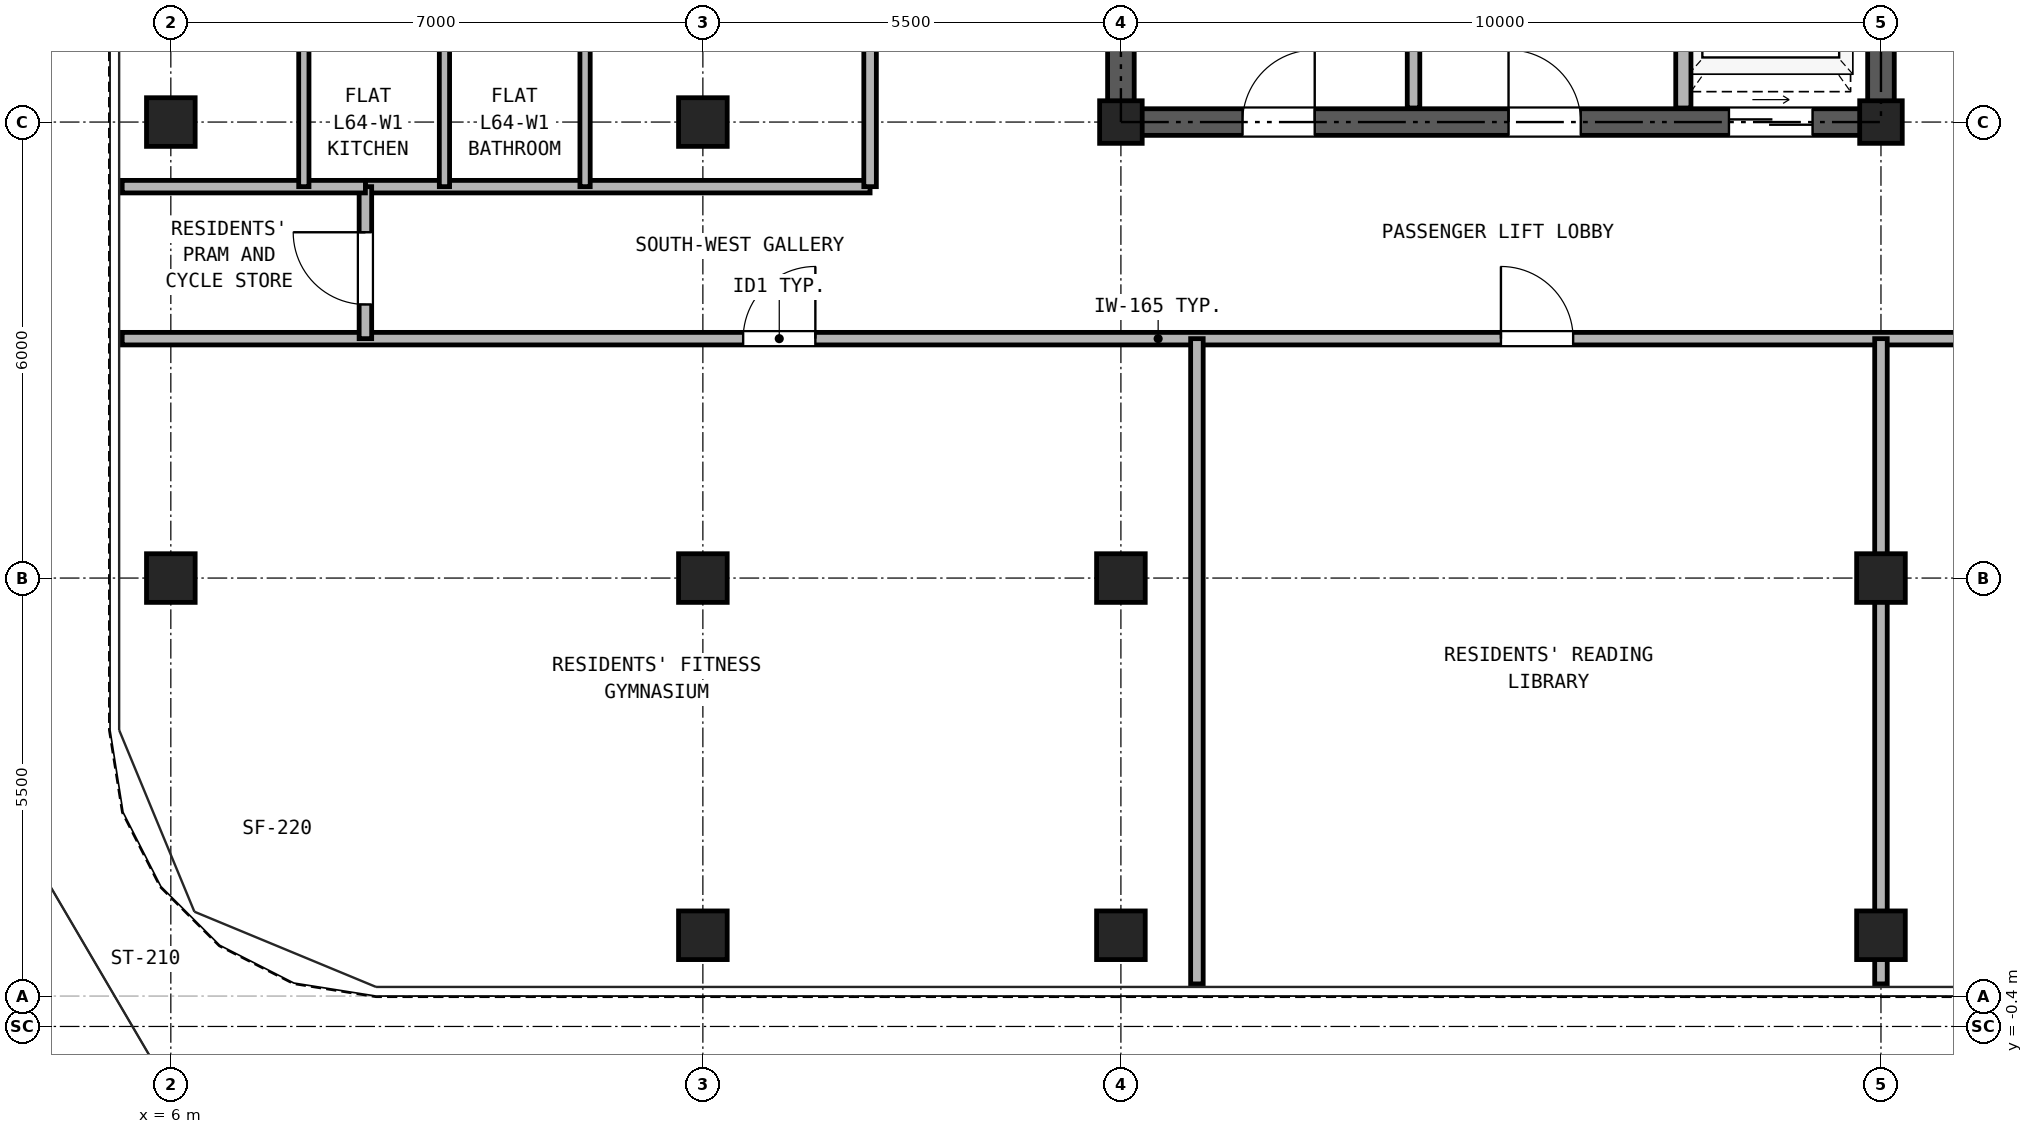
"""IFC4 building model, lengths in metres.
Left out: names, types, materials, properties, quantities, classifications, styles, units other than length and angle.
Written with IfcOpenShell. Run it as: python <this file> out.ifc"""

import sys

from ifc_helpers import new_model, si_unit, direction, frame, frame_2d, origin, origin_2d, place, context, subcontext, project, spatial, rectangle, hollow_rectangle, extrude, source, transform, mapped, element, fill, save


model = new_model("IFC4")
c1 = context("Model", 3, precision=1e-05, world=origin(), true_north=direction((0.0, 1.0)))
c2 = subcontext(c1, "Body", "Model", "MODEL_VIEW")
j1 = project(units=[si_unit("LENGTHUNIT", "METRE"), si_unit("PLANEANGLEUNIT", "RADIAN")], contexts=[c1])
p1 = place(None, origin())
s1 = spatial("IfcSite", under=j1, at=p1, CompositionType="ELEMENT")
p2 = place(p1, origin())
s2 = spatial("IfcBuilding", under=s1, at=p2, CompositionType="ELEMENT")
p3 = place(p2, frame((0.0, 0.0, 226.5)))
s3 = spatial("IfcBuildingStorey", under=s2, at=p3, CompositionType="ELEMENT", Elevation=226.5)
m1 = source(origin(), c2, "Body", "SweptSolid", [
    extrude(hollow_rectangle(XDim=0.64, YDim=0.64, WallThickness=0.035, at=origin_2d()), origin(), (0.0, 0.0, 1.0), 2.98),
])
for number, where, z_axis, x_axis in (
    (1, (13.0, 0.8, 0.0), (0.0, 0.0, 1.0), (1.0, 0.0, 0.0)),
    (2, (18.5, 0.8, 0.0), (0.0, 0.0, 1.0), (1.0, 0.0, 0.0)),
    (3, (28.5, 0.8, 0.0), (0.0, 0.0, 1.0), (1.0, 0.0, 0.0)),
    (4, (6.0, 5.5, 0.0), (0.0, 0.0, 1.0), (1.0, 0.0, 0.0)),
    (5, (6.0, 11.5, 0.0), (0.0, 0.0, 1.0), (1.0, 0.0, 0.0)),
    (6, (13.0, 5.5, 0.0), (0.0, 0.0, 1.0), (1.0, 0.0, 0.0)),
    (7, (13.0, 11.5, 0.0), (0.0, 0.0, 1.0), (1.0, 0.0, 0.0)),
    (8, (18.5, 5.5, 0.0), (0.0, 0.0, 1.0), (1.0, 0.0, 0.0)),
):
    element("IfcColumn", number, at=place(p3, frame(where, z_axis=z_axis, x_axis=x_axis)), inside=s3, PredefinedType="COLUMN", context=c2, shape_type="MappedRepresentation", body=[
        mapped(m1, transform((0.0, 0.0, 0.0), x_axis=(1.0, 0.0, 0.0), y_axis=(0.0, 1.0, 0.0), z_axis=(0.0, 0.0, 1.0), scale=1.0)),
    ])
m2 = source(origin(), c2, "Body", "SweptSolid", [
    extrude(hollow_rectangle(XDim=0.56, YDim=0.56, WallThickness=0.03, at=origin_2d()), origin(), (0.0, 0.0, 1.0), 2.98),
])
p4 = place(p3, frame((18.5, 11.5, 0.0), z_axis=(0.0, 0.0, 1.0), x_axis=(1.0, 0.0, 0.0)))
e9 = element("IfcColumn", 9, at=p4, inside=s3, PredefinedType="COLUMN", context=c2, shape_type="MappedRepresentation", body=[
    mapped(m2, transform((0.0, 0.0, 0.0), x_axis=(1.0, 0.0, 0.0), y_axis=(0.0, 1.0, 0.0), z_axis=(0.0, 0.0, 1.0), scale=1.0)),
])
p5 = place(p3, frame((28.5, 5.5, 0.0), z_axis=(0.0, 0.0, 1.0), x_axis=(1.0, 0.0, 0.0)))
e10 = element("IfcColumn", 10, at=p5, inside=s3, PredefinedType="COLUMN", context=c2, shape_type="MappedRepresentation", body=[
    mapped(m1, transform((0.0, 0.0, 0.0), x_axis=(1.0, 0.0, 0.0), y_axis=(0.0, 1.0, 0.0), z_axis=(0.0, 0.0, 1.0), scale=1.0)),
])
p6 = place(p3, frame((28.5, 11.5, 0.0), z_axis=(0.0, 0.0, 1.0), x_axis=(1.0, 0.0, 0.0)))
e11 = element("IfcColumn", 11, at=p6, inside=s3, PredefinedType="COLUMN", context=c2, shape_type="MappedRepresentation", body=[
    mapped(m2, transform((0.0, 0.0, 0.0), x_axis=(1.0, 0.0, 0.0), y_axis=(0.0, 1.0, 0.0), z_axis=(0.0, 0.0, 1.0), scale=1.0)),
])
p7 = place(p3, frame((18.325, 11.5, 0.0), z_axis=(0.0, 0.0, 1.0), x_axis=(1.0, 0.0, 0.0)))
e12 = element("IfcWall", 12, at=p7, inside=s3, PredefinedType="SHEAR", context=c2, shape_type="SweptSolid", body=[
    extrude(rectangle(XDim=10.35, YDim=0.35, at=frame_2d((5.175, 0.0))), origin(), (0.0, 0.0, 1.0), 2.98),
])
p8 = place(p7, frame((1.775, 0.0, 0.0)))
e13 = element("IfcOpeningElement", 13, at=p8, cuts=e12, PredefinedType="OPENING", context=c2, shape_type="SweptSolid", body=[
    extrude(rectangle(XDim=0.95, YDim=2.15, at=frame_2d((0.475, 1.075))), frame((0.0, 0.185, 0.0), z_axis=(0.0, -1.0, 0.0), x_axis=(1.0, 0.0, 0.0)), (0.0, 0.0, 1.0), 0.37),
])
p9 = place(p7, frame((5.275, 0.0, 0.0)))
e14 = element("IfcOpeningElement", 14, at=p9, cuts=e12, PredefinedType="OPENING", context=c2, shape_type="SweptSolid", body=[
    extrude(rectangle(XDim=0.95, YDim=2.15, at=frame_2d((0.475, 1.075))), frame((0.0, 0.185, 0.0), z_axis=(0.0, -1.0, 0.0), x_axis=(1.0, 0.0, 0.0)), (0.0, 0.0, 1.0), 0.37),
])
p10 = place(p7, frame((8.175, 0.0, 0.0)))
e15 = element("IfcOpeningElement", 15, at=p10, cuts=e12, PredefinedType="OPENING", context=c2, shape_type="SweptSolid", body=[
    extrude(rectangle(XDim=1.1, YDim=2.25, at=frame_2d((0.55, 1.125))), frame((0.0, 0.185, 0.0), z_axis=(0.0, -1.0, 0.0), x_axis=(1.0, 0.0, 0.0)), (0.0, 0.0, 1.0), 0.37),
])
p11 = place(p3, frame((18.5, 11.675, 0.0), z_axis=(0.0, 0.0, 1.0), x_axis=(0.0, 1.0, 0.0)))
e16 = element("IfcWall", 16, at=p11, inside=s3, PredefinedType="SHEAR", context=c2, shape_type="SweptSolid", body=[
    extrude(rectangle(XDim=16.9, YDim=0.35, at=frame_2d((8.45, 0.0))), origin(), (0.0, 0.0, 1.0), 2.98),
])
p12 = place(p11, frame((7.475, 0.0, 0.0)))
e17 = element("IfcOpeningElement", 17, at=p12, cuts=e16, PredefinedType="OPENING", context=c2, shape_type="SweptSolid", body=[
    extrude(rectangle(XDim=1.15, YDim=2.2, at=frame_2d((0.575, 1.1))), frame((0.0, 0.185, 0.0), z_axis=(0.0, -1.0, 0.0), x_axis=(1.0, 0.0, 0.0)), (0.0, 0.0, 1.0), 0.37),
])
p13 = place(p3, frame((28.5, 11.675, 0.0), z_axis=(0.0, 0.0, 1.0), x_axis=(0.0, 1.0, 0.0)))
e18 = element("IfcWall", 18, at=p13, inside=s3, PredefinedType="SHEAR", context=c2, shape_type="SweptSolid", body=[
    extrude(rectangle(XDim=16.9, YDim=0.35, at=frame_2d((8.45, 0.0))), origin(), (0.0, 0.0, 1.0), 2.98),
])
p14 = place(p13, frame((7.475, 0.0, 0.0)))
e19 = element("IfcOpeningElement", 19, at=p14, cuts=e18, PredefinedType="OPENING", context=c2, shape_type="SweptSolid", body=[
    extrude(rectangle(XDim=1.15, YDim=2.2, at=frame_2d((0.575, 1.1))), frame((0.0, 0.185, 0.0), z_axis=(0.0, -1.0, 0.0), x_axis=(1.0, 0.0, 0.0)), (0.0, 0.0, 1.0), 0.37),
])
p15 = place(p3, frame((22.35, 11.685, 0.0), z_axis=(0.0, 0.0, 1.0), x_axis=(0.0, 1.0, 0.0)))
e20 = element("IfcWall", 20, at=p15, inside=s3, PredefinedType="PARTITIONING", context=c2, shape_type="SweptSolid", body=[
    extrude(rectangle(XDim=3.315, YDim=0.165, at=frame_2d((1.657, 0.0))), origin(), (0.0, 0.0, 1.0), 2.98),
])
p16 = place(p3, frame((25.9, 11.685, 0.0), z_axis=(0.0, 0.0, 1.0), x_axis=(0.0, 1.0, 0.0)))
e21 = element("IfcWall", 21, at=p16, inside=s3, PredefinedType="PARTITIONING", context=c2, shape_type="SweptSolid", body=[
    extrude(rectangle(XDim=3.315, YDim=0.2, at=frame_2d((1.657, 0.0))), origin(), (0.0, 0.0, 1.0), 2.98),
])
p17 = place(p3, frame((5.36, 8.65, 0.0), z_axis=(0.0, 0.0, 1.0), x_axis=(1.0, 0.0, 0.0)))
e22 = element("IfcWall", 22, at=p17, inside=s3, PredefinedType="PARTITIONING", context=c2, shape_type="SweptSolid", body=[
    extrude(rectangle(XDim=36.28, YDim=0.165, at=frame_2d((18.14, 0.0))), origin(), (0.0, 0.0, 1.0), 2.655),
])
p18 = place(p17, frame((8.17, 0.0, 0.0)))
e23 = element("IfcOpeningElement", 23, at=p18, cuts=e22, PredefinedType="OPENING", context=c2, shape_type="SweptSolid", body=[
    extrude(rectangle(XDim=0.95, YDim=2.15, at=frame_2d((0.475, 1.075))), frame((0.0, 0.093, 0.0), z_axis=(0.0, -1.0, 0.0), x_axis=(1.0, 0.0, 0.0)), (0.0, 0.0, 1.0), 0.185),
])
p19 = place(p17, frame((18.14, 0.0, 0.0)))
e24 = element("IfcOpeningElement", 24, at=p19, cuts=e22, PredefinedType="OPENING", context=c2, shape_type="SweptSolid", body=[
    extrude(rectangle(XDim=0.95, YDim=2.15, at=frame_2d((0.475, 1.075))), frame((0.0, 0.093, 0.0), z_axis=(0.0, -1.0, 0.0), x_axis=(1.0, 0.0, 0.0)), (0.0, 0.0, 1.0), 0.185),
])
p20 = place(p17, frame((25.14, 0.0, 0.0)))
e25 = element("IfcOpeningElement", 25, at=p20, cuts=e22, PredefinedType="OPENING", context=c2, shape_type="SweptSolid", body=[
    extrude(rectangle(XDim=0.95, YDim=2.15, at=frame_2d((0.475, 1.075))), frame((0.0, 0.093, 0.0), z_axis=(0.0, -1.0, 0.0), x_axis=(1.0, 0.0, 0.0)), (0.0, 0.0, 1.0), 0.185),
])
p21 = place(p17, frame((29.99, 0.0, 0.0)))
e26 = element("IfcOpeningElement", 26, at=p21, cuts=e22, PredefinedType="OPENING", context=c2, shape_type="SweptSolid", body=[
    extrude(rectangle(XDim=0.95, YDim=2.15, at=frame_2d((0.475, 1.075))), frame((0.0, 0.093, 0.0), z_axis=(0.0, -1.0, 0.0), x_axis=(1.0, 0.0, 0.0)), (0.0, 0.0, 1.0), 0.185),
])
p22 = place(p3, frame((8.56, 10.65, 0.0), z_axis=(0.0, 0.0, 1.0), x_axis=(1.0, 0.0, 0.0)))
e27 = element("IfcWall", 27, at=p22, inside=s3, PredefinedType="PARTITIONING", context=c2, shape_type="SweptSolid", body=[
    extrude(rectangle(XDim=6.64, YDim=0.165, at=frame_2d((3.32, 0.0))), origin(), (0.0, 0.0, 1.0), 2.98),
])
p23 = place(p3, frame((8.56, 8.65, 0.0), z_axis=(0.0, 0.0, 1.0), x_axis=(0.0, 1.0, 0.0)))
e28 = element("IfcWall", 28, at=p23, inside=s3, PredefinedType="PARTITIONING", context=c2, shape_type="SweptSolid", body=[
    extrude(rectangle(XDim=2.0, YDim=0.165, at=frame_2d((1.0, 0.0))), origin(), (0.0, 0.0, 1.0), 2.98),
])
p24 = place(p23, frame((0.45, 0.0, 0.0)))
e29 = element("IfcOpeningElement", 29, at=p24, cuts=e28, PredefinedType="OPENING", context=c2, shape_type="SweptSolid", body=[
    extrude(rectangle(XDim=0.95, YDim=2.15, at=frame_2d((0.475, 1.075))), frame((0.0, 0.093, 0.0), z_axis=(0.0, -1.0, 0.0), x_axis=(1.0, 0.0, 0.0)), (0.0, 0.0, 1.0), 0.185),
])
p25 = place(p3, frame((15.2, 10.65, 0.0), z_axis=(0.0, 0.0, 1.0), x_axis=(0.0, 1.0, 0.0)))
e30 = element("IfcWall", 30, at=p25, inside=s3, PredefinedType="PARTITIONING", context=c2, shape_type="SweptSolid", body=[
    extrude(rectangle(XDim=24.49, YDim=0.165, at=frame_2d((12.245, 0.0))), origin(), (0.0, 0.0, 1.0), 2.98),
])
p26 = place(p25, frame((3.425, 0.0, 0.0)))
e31 = element("IfcOpeningElement", 31, at=p26, cuts=e30, PredefinedType="OPENING", context=c2, shape_type="SweptSolid", body=[
    extrude(rectangle(XDim=1.0, YDim=2.15, at=frame_2d((0.5, 1.075))), frame((0.0, 0.093, 0.0), z_axis=(0.0, -1.0, 0.0), x_axis=(1.0, 0.0, 0.0)), (0.0, 0.0, 1.0), 0.185),
])
p27 = place(p25, frame((11.5, 0.0, 0.0)))
e32 = element("IfcOpeningElement", 32, at=p27, cuts=e30, PredefinedType="OPENING", context=c2, shape_type="SweptSolid", body=[
    extrude(rectangle(XDim=1.0, YDim=2.15, at=frame_2d((0.5, 1.075))), frame((0.0, 0.093, 0.0), z_axis=(0.0, -1.0, 0.0), x_axis=(1.0, 0.0, 0.0)), (0.0, 0.0, 1.0), 0.185),
])
p28 = place(p25, frame((18.15, 0.0, 0.0)))
e33 = element("IfcOpeningElement", 33, at=p28, cuts=e30, PredefinedType="OPENING", context=c2, shape_type="SweptSolid", body=[
    extrude(rectangle(XDim=1.0, YDim=2.15, at=frame_2d((0.5, 1.075))), frame((0.0, 0.093, 0.0), z_axis=(0.0, -1.0, 0.0), x_axis=(1.0, 0.0, 0.0)), (0.0, 0.0, 1.0), 0.185),
])
p29 = place(p3, frame((19.5, 0.16, 0.0), z_axis=(0.0, 0.0, 1.0), x_axis=(0.0, 1.0, 0.0)))
e34 = element("IfcWall", 34, at=p29, inside=s3, PredefinedType="PARTITIONING", context=c2, shape_type="SweptSolid", body=[
    extrude(rectangle(XDim=8.49, YDim=0.165, at=frame_2d((4.245, 0.0))), origin(), (0.0, 0.0, 1.0), 2.98),
])
p30 = place(p3, frame((28.5, 0.16, 0.0), z_axis=(0.0, 0.0, 1.0), x_axis=(0.0, 1.0, 0.0)))
e35 = element("IfcWall", 35, at=p30, inside=s3, PredefinedType="PARTITIONING", context=c2, shape_type="SweptSolid", body=[
    extrude(rectangle(XDim=8.49, YDim=0.165, at=frame_2d((4.245, 0.0))), origin(), (0.0, 0.0, 1.0), 2.428),
])
p31 = place(p3, frame((5.36, 10.65, 0.0), z_axis=(0.0, 0.0, 1.0), x_axis=(1.0, 0.0, 0.0)))
e36 = element("IfcWall", 36, at=p31, inside=s3, PredefinedType="PARTITIONING", context=c2, shape_type="SweptSolid", body=[
    extrude(rectangle(XDim=3.2, YDim=0.165, at=frame_2d((1.6, 0.0))), origin(), (0.0, 0.0, 1.0), 2.98),
])
for number, where, z_axis, x_axis in (
    (37, (7.75, 10.65, 0.0), (0.0, 0.0, 1.0), (0.0, 1.0, 0.0)),
    (38, (9.6, 10.65, 0.0), (0.0, 0.0, 1.0), (0.0, 1.0, 0.0)),
    (39, (11.45, 10.65, 0.0), (0.0, 0.0, 1.0), (0.0, 1.0, 0.0)),
):
    element("IfcWall", number, at=place(p3, frame(where, z_axis=z_axis, x_axis=x_axis)), inside=s3, PredefinedType="PARTITIONING", context=c2, shape_type="SweptSolid", body=[
        extrude(rectangle(XDim=2.15, YDim=0.135, at=frame_2d((1.075, 0.0))), origin(), (0.0, 0.0, 1.0), 2.98),
    ])
p32 = place(p8, frame((0.95, 0.0, 0.0), z_axis=(0.0, 0.0, 1.0), x_axis=(-1.0, 0.0, 0.0)))
e40 = element("IfcDoor", 40, at=p32, inside=s3, OperationType="SINGLE_SWING_RIGHT", PredefinedType="DOOR", context=c2, shape_type="SweptSolid", body=[
    extrude(rectangle(XDim=0.95, YDim=2.15, at=frame_2d((0.475, 1.075))), frame((0.0, 0.025, 0.0), z_axis=(0.0, -1.0, 0.0), x_axis=(1.0, 0.0, 0.0)), (0.0, 0.0, 1.0), 0.05),
])
fill(e13, e40)
p33 = place(p9, frame((0.95, 0.0, 0.0), z_axis=(0.0, 0.0, 1.0), x_axis=(-1.0, 0.0, 0.0)))
e41 = element("IfcDoor", 41, at=p33, inside=s3, OperationType="SINGLE_SWING_LEFT", PredefinedType="DOOR", context=c2, shape_type="SweptSolid", body=[
    extrude(rectangle(XDim=0.95, YDim=2.15, at=frame_2d((0.475, 1.075))), frame((0.0, 0.025, 0.0), z_axis=(0.0, -1.0, 0.0), x_axis=(1.0, 0.0, 0.0)), (0.0, 0.0, 1.0), 0.05),
])
fill(e14, e41)
p34 = place(p10, frame((1.1, 0.0, 0.0), z_axis=(0.0, 0.0, 1.0), x_axis=(-1.0, 0.0, 0.0)))
e42 = element("IfcDoor", 42, at=p34, inside=s3, OperationType="DOUBLE_DOOR_SLIDING", PredefinedType="DOOR", context=c2, shape_type="SweptSolid", body=[
    extrude(rectangle(XDim=1.1, YDim=2.25, at=frame_2d((0.55, 1.125))), frame((0.0, 0.025, 0.0), z_axis=(0.0, -1.0, 0.0), x_axis=(1.0, 0.0, 0.0)), (0.0, 0.0, 1.0), 0.05),
])
fill(e15, e42)
p35 = place(p18, frame((0.95, 0.0, 0.0), z_axis=(0.0, 0.0, 1.0), x_axis=(-1.0, 0.0, 0.0)))
e43 = element("IfcDoor", 43, at=p35, inside=s3, OperationType="SINGLE_SWING_RIGHT", PredefinedType="DOOR", context=c2, shape_type="SweptSolid", body=[
    extrude(rectangle(XDim=0.95, YDim=2.15, at=frame_2d((0.475, 1.075))), frame((0.0, 0.025, 0.0), z_axis=(0.0, -1.0, 0.0), x_axis=(1.0, 0.0, 0.0)), (0.0, 0.0, 1.0), 0.05),
])
fill(e23, e43)
p36 = place(p19, frame((0.95, 0.0, 0.0), z_axis=(0.0, 0.0, 1.0), x_axis=(-1.0, 0.0, 0.0)))
e44 = element("IfcDoor", 44, at=p36, inside=s3, OperationType="SINGLE_SWING_LEFT", PredefinedType="DOOR", context=c2, shape_type="SweptSolid", body=[
    extrude(rectangle(XDim=0.95, YDim=2.15, at=frame_2d((0.475, 1.075))), frame((0.0, 0.025, 0.0), z_axis=(0.0, -1.0, 0.0), x_axis=(1.0, 0.0, 0.0)), (0.0, 0.0, 1.0), 0.05),
])
fill(e24, e44)
p37 = place(p24, frame((0.95, 0.0, 0.0), z_axis=(0.0, 0.0, 1.0), x_axis=(-1.0, 0.0, 0.0)))
e45 = element("IfcDoor", 45, at=p37, inside=s3, OperationType="SINGLE_SWING_RIGHT", PredefinedType="DOOR", context=c2, shape_type="SweptSolid", body=[
    extrude(rectangle(XDim=0.95, YDim=2.15, at=frame_2d((0.475, 1.075))), frame((0.0, 0.025, 0.0), z_axis=(0.0, -1.0, 0.0), x_axis=(1.0, 0.0, 0.0)), (0.0, 0.0, 1.0), 0.05),
])
fill(e29, e45)
save(model, sys.argv[1])
